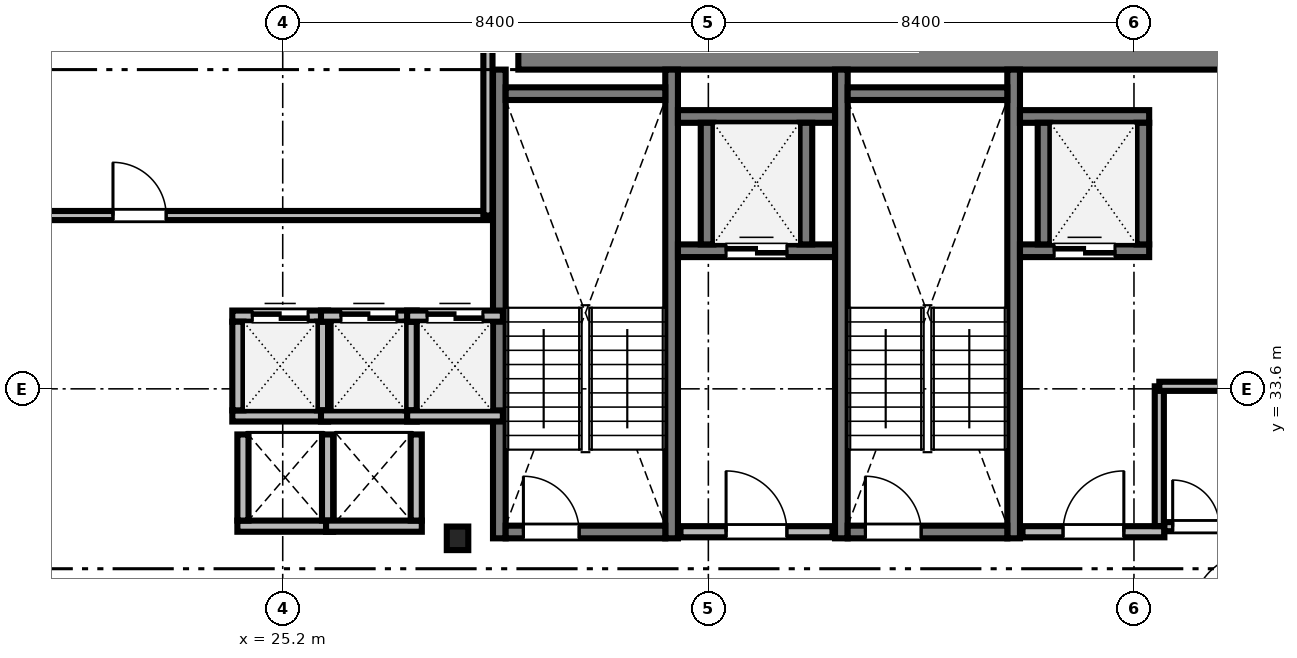
"""IFC4 building model, lengths in metres.
Left out: names, types, materials, properties, quantities, classifications, styles, units other than length and angle.
Written with IfcOpenShell. Run it as: python <this file> out.ifc"""

import sys

from ifc_helpers import new_model, si_unit, direction, frame, frame_2d, origin, origin_2d, place, context, subcontext, project, spatial, rectangle, i_section, extrude, source, transform, mapped, element, fill, save


model = new_model("IFC4")
c1 = context("Model", 3, precision=1e-05, world=origin(), true_north=direction((0.0, 1.0)))
c2 = subcontext(c1, "Body", "Model", "MODEL_VIEW")
j1 = project(units=[si_unit("LENGTHUNIT", "METRE"), si_unit("PLANEANGLEUNIT", "RADIAN")], contexts=[c1])
p1 = place(None, origin())
s1 = spatial("IfcSite", under=j1, at=p1, CompositionType="ELEMENT")
p2 = place(p1, origin())
s2 = spatial("IfcBuilding", under=s1, at=p2, CompositionType="ELEMENT")
p3 = place(p2, frame((0.0, 0.0, 140.9)))
s3 = spatial("IfcBuildingStorey", under=s2, at=p3, CompositionType="ELEMENT", Elevation=140.9)
m1 = source(origin(), c2, "Body", "SweptSolid", [
    extrude(rectangle(XDim=17.52, YDim=0.8, at=frame_2d((8.76, 0.0))), origin(), (0.0, 0.0, 1.0), 3.46),
])
p4 = place(p3, frame((29.85, 40.3, 0.0), z_axis=(0.0, 0.0, 1.0), x_axis=(1.0, 0.0, 0.0)))
e1 = element("IfcWall", 1, at=p4, inside=s3, PredefinedType="SHEAR", context=c2, shape_type="MappedRepresentation", body=[
    mapped(m1, transform((0.0, 0.0, 0.0), scale=1.0)),
])
m2 = source(origin(), c2, "Body", "SweptSolid", [
    extrude(i_section(OverallWidth=0.424, OverallDepth=0.465, WebThickness=0.035, FlangeThickness=0.056, FilletRadius=0.015, at=origin_2d()), origin(), (0.0, 0.0, 1.0), 3.46),
])
p5 = place(p3, frame((28.65, 30.65, 0.0), z_axis=(0.0, 0.0, 1.0), x_axis=(1.0, 0.0, 0.0)))
e2 = element("IfcColumn", 2, at=p5, inside=s3, PredefinedType="COLUMN", context=c2, shape_type="MappedRepresentation", body=[
    mapped(m2, transform((0.0, 0.0, 0.0), scale=1.0)),
])
m3 = source(origin(), c2, "Body", "SweptSolid", [
    extrude(rectangle(XDim=9.25, YDim=0.25, at=frame_2d((4.625, 0.0))), origin(), (0.0, 0.0, 1.0), 3.5),
])
for number, where, z_axis, x_axis in (
    (3, (29.475, 30.65, 0.0), (0.0, 0.0, 1.0), (0.0, 1.0, 0.0)),
    (4, (32.875, 30.65, 0.0), (0.0, 0.0, 1.0), (0.0, 1.0, 0.0)),
):
    element("IfcWall", number, at=place(p3, frame(where, z_axis=z_axis, x_axis=x_axis)), inside=s3, PredefinedType="SOLIDWALL", context=c2, shape_type="MappedRepresentation", body=[
        mapped(m3, transform((0.0, 0.0, 0.0), scale=1.0)),
    ])
m4 = source(origin(), c2, "Body", "SweptSolid", [
    extrude(rectangle(XDim=3.15, YDim=0.25, at=frame_2d((1.575, 0.0))), origin(), (0.0, 0.0, 1.0), 3.5),
])
p6 = place(p3, frame((29.6, 39.425, 0.0), z_axis=(0.0, 0.0, 1.0), x_axis=(1.0, 0.0, 0.0)))
e5 = element("IfcWall", 5, at=p6, inside=s3, PredefinedType="SOLIDWALL", context=c2, shape_type="MappedRepresentation", body=[
    mapped(m4, transform((0.0, 0.0, 0.0), scale=1.0)),
])
p7 = place(p3, frame((29.6, 30.775, 0.0), z_axis=(0.0, 0.0, 1.0), x_axis=(1.0, 0.0, 0.0)))
e6 = element("IfcWall", 6, at=p7, inside=s3, PredefinedType="SOLIDWALL", context=c2, shape_type="MappedRepresentation", body=[
    mapped(m4, transform((0.0, 0.0, 0.0), scale=1.0)),
])
m5 = source(origin(), c2, "Body", "SweptSolid", [
    extrude(rectangle(XDim=1.1, YDim=2.2, at=frame_2d((0.55, 1.1))), frame((0.0, 0.135, 0.0), z_axis=(0.0, -1.0, 0.0), x_axis=(1.0, 0.0, 0.0)), (0.0, 0.0, 1.0), 0.27),
])
p8 = place(p7, frame((0.35, 0.0, 0.0)))
e7 = element("IfcOpeningElement", 7, at=p8, cuts=e6, PredefinedType="OPENING", context=c2, shape_type="MappedRepresentation", body=[
    mapped(m5, transform((0.0, 0.0, 0.0), scale=1.0)),
])
for number, where, z_axis, x_axis in (
    (8, (36.225, 30.65, 0.0), (0.0, 0.0, 1.0), (0.0, 1.0, 0.0)),
    (9, (39.625, 30.65, 0.0), (0.0, 0.0, 1.0), (0.0, 1.0, 0.0)),
):
    element("IfcWall", number, at=place(p3, frame(where, z_axis=z_axis, x_axis=x_axis)), inside=s3, PredefinedType="SOLIDWALL", context=c2, shape_type="MappedRepresentation", body=[
        mapped(m3, transform((0.0, 0.0, 0.0), scale=1.0)),
    ])
p9 = place(p3, frame((36.35, 39.425, 0.0), z_axis=(0.0, 0.0, 1.0), x_axis=(1.0, 0.0, 0.0)))
e10 = element("IfcWall", 10, at=p9, inside=s3, PredefinedType="SOLIDWALL", context=c2, shape_type="MappedRepresentation", body=[
    mapped(m4, transform((0.0, 0.0, 0.0), scale=1.0)),
])
p10 = place(p3, frame((36.35, 30.775, 0.0), z_axis=(0.0, 0.0, 1.0), x_axis=(1.0, 0.0, 0.0)))
e11 = element("IfcWall", 11, at=p10, inside=s3, PredefinedType="SOLIDWALL", context=c2, shape_type="MappedRepresentation", body=[
    mapped(m4, transform((0.0, 0.0, 0.0), scale=1.0)),
])
p11 = place(p10, frame((0.35, 0.0, 0.0)))
e12 = element("IfcOpeningElement", 12, at=p11, cuts=e11, PredefinedType="OPENING", context=c2, shape_type="MappedRepresentation", body=[
    mapped(m5, transform((0.0, 0.0, 0.0), scale=1.0)),
])
m6 = source(origin(), c2, "Body", "SweptSolid", [
    extrude(rectangle(XDim=3.0, YDim=0.22, at=frame_2d((1.5, 0.0))), origin(), (0.0, 0.0, 1.0), 3.46),
])
p12 = place(p3, frame((33.05, 30.78, 0.0), z_axis=(0.0, 0.0, 1.0), x_axis=(1.0, 0.0, 0.0)))
e13 = element("IfcWall", 13, at=p12, inside=s3, PredefinedType="SOLIDWALL", context=c2, shape_type="MappedRepresentation", body=[
    mapped(m6, transform((0.0, 0.0, 0.0), scale=1.0)),
])
m7 = source(origin(), c2, "Body", "SweptSolid", [
    extrude(rectangle(XDim=1.2, YDim=2.2, at=frame_2d((0.6, 1.1))), frame((0.0, 0.12, 0.0), z_axis=(0.0, -1.0, 0.0), x_axis=(1.0, 0.0, 0.0)), (0.0, 0.0, 1.0), 0.24),
])
p13 = place(p12, frame((0.9, 0.0, 0.0)))
e14 = element("IfcOpeningElement", 14, at=p13, cuts=e13, PredefinedType="OPENING", context=c2, shape_type="MappedRepresentation", body=[
    mapped(m7, transform((0.0, 0.0, 0.0), scale=1.0)),
])
m8 = source(origin(), c2, "Body", "SweptSolid", [
    extrude(rectangle(XDim=2.8, YDim=0.22, at=frame_2d((1.4, 0.0))), origin(), (0.0, 0.0, 1.0), 3.46),
])
p14 = place(p3, frame((39.8, 30.78, 0.0), z_axis=(0.0, 0.0, 1.0), x_axis=(1.0, 0.0, 0.0)))
e15 = element("IfcWall", 15, at=p14, inside=s3, PredefinedType="SOLIDWALL", context=c2, shape_type="MappedRepresentation", body=[
    mapped(m8, transform((0.0, 0.0, 0.0), scale=1.0)),
])
p15 = place(p14, frame((0.8, 0.0, 0.0)))
e16 = element("IfcOpeningElement", 16, at=p15, cuts=e15, PredefinedType="OPENING", context=c2, shape_type="MappedRepresentation", body=[
    mapped(m7, transform((0.0, 0.0, 0.0), scale=1.0)),
])
m9 = source(origin(), c2, "Body", "SweptSolid", [
    extrude(rectangle(XDim=1.89, YDim=0.22, at=frame_2d((0.945, 0.0))), origin(), (0.0, 0.0, 1.0), 3.46),
])
p16 = place(p3, frame((24.205, 33.065, 0.0), z_axis=(0.0, 0.0, 1.0), x_axis=(1.0, 0.0, 0.0)))
e17 = element("IfcWall", 17, at=p16, inside=s3, PredefinedType="SOLIDWALL", context=c2, shape_type="MappedRepresentation", body=[
    mapped(m9, transform((0.0, 0.0, 0.0), scale=1.0)),
])
p17 = place(p3, frame((24.205, 35.035, 0.0), z_axis=(0.0, 0.0, 1.0), x_axis=(1.0, 0.0, 0.0)))
e18 = element("IfcWall", 18, at=p17, inside=s3, PredefinedType="SOLIDWALL", context=c2, shape_type="MappedRepresentation", body=[
    mapped(m9, transform((0.0, 0.0, 0.0), scale=1.0)),
])
m10 = source(origin(), c2, "Body", "SweptSolid", [
    extrude(rectangle(XDim=1.1, YDim=2.2, at=frame_2d((0.55, 1.1))), frame((0.0, 0.12, 0.0), z_axis=(0.0, -1.0, 0.0), x_axis=(1.0, 0.0, 0.0)), (0.0, 0.0, 1.0), 0.24),
])
p18 = place(p17, frame((0.395, 0.0, 0.0)))
e19 = element("IfcOpeningElement", 19, at=p18, cuts=e18, PredefinedType="OPENING", context=c2, shape_type="MappedRepresentation", body=[
    mapped(m10, transform((0.0, 0.0, 0.0), scale=1.0)),
])
m11 = source(origin(), c2, "Body", "SweptSolid", [
    extrude(rectangle(XDim=1.75, YDim=0.22, at=frame_2d((0.875, 0.0))), origin(), (0.0, 0.0, 1.0), 3.46),
])
for number, where, z_axis, x_axis in (
    (20, (24.315, 33.175, 0.0), (0.0, 0.0, 1.0), (0.0, 1.0, 0.0)),
    (21, (25.985, 33.175, 0.0), (0.0, 0.0, 1.0), (0.0, 1.0, 0.0)),
):
    element("IfcWall", number, at=place(p3, frame(where, z_axis=z_axis, x_axis=x_axis)), inside=s3, PredefinedType="SOLIDWALL", context=c2, shape_type="MappedRepresentation", body=[
        mapped(m11, transform((0.0, 0.0, 0.0), scale=1.0)),
    ])
p19 = place(p3, frame((25.955, 33.065, 0.0), z_axis=(0.0, 0.0, 1.0), x_axis=(1.0, 0.0, 0.0)))
e22 = element("IfcWall", 22, at=p19, inside=s3, PredefinedType="SOLIDWALL", context=c2, shape_type="MappedRepresentation", body=[
    mapped(m9, transform((0.0, 0.0, 0.0), scale=1.0)),
])
p20 = place(p3, frame((25.955, 35.035, 0.0), z_axis=(0.0, 0.0, 1.0), x_axis=(1.0, 0.0, 0.0)))
e23 = element("IfcWall", 23, at=p20, inside=s3, PredefinedType="SOLIDWALL", context=c2, shape_type="MappedRepresentation", body=[
    mapped(m9, transform((0.0, 0.0, 0.0), scale=1.0)),
])
p21 = place(p20, frame((0.395, 0.0, 0.0)))
e24 = element("IfcOpeningElement", 24, at=p21, cuts=e23, PredefinedType="OPENING", context=c2, shape_type="MappedRepresentation", body=[
    mapped(m10, transform((0.0, 0.0, 0.0), scale=1.0)),
])
p22 = place(p3, frame((27.735, 33.175, 0.0), z_axis=(0.0, 0.0, 1.0), x_axis=(0.0, 1.0, 0.0)))
e25 = element("IfcWall", 25, at=p22, inside=s3, PredefinedType="SOLIDWALL", context=c2, shape_type="MappedRepresentation", body=[
    mapped(m11, transform((0.0, 0.0, 0.0), scale=1.0)),
])
p23 = place(p3, frame((27.655, 33.065, 0.0), z_axis=(0.0, 0.0, 1.0), x_axis=(1.0, 0.0, 0.0)))
e26 = element("IfcWall", 26, at=p23, inside=s3, PredefinedType="SOLIDWALL", context=c2, shape_type="MappedRepresentation", body=[
    mapped(m9, transform((0.0, 0.0, 0.0), scale=1.0)),
])
p24 = place(p3, frame((27.655, 35.035, 0.0), z_axis=(0.0, 0.0, 1.0), x_axis=(1.0, 0.0, 0.0)))
e27 = element("IfcWall", 27, at=p24, inside=s3, PredefinedType="SOLIDWALL", context=c2, shape_type="MappedRepresentation", body=[
    mapped(m9, transform((0.0, 0.0, 0.0), scale=1.0)),
])
p25 = place(p24, frame((0.395, 0.0, 0.0)))
e28 = element("IfcOpeningElement", 28, at=p25, cuts=e27, PredefinedType="OPENING", context=c2, shape_type="MappedRepresentation", body=[
    mapped(m10, transform((0.0, 0.0, 0.0), scale=1.0)),
])
m12 = source(origin(), c2, "Body", "SweptSolid", [
    extrude(rectangle(XDim=3.1, YDim=0.25, at=frame_2d((1.55, 0.0))), origin(), (0.0, 0.0, 1.0), 3.46),
])
p26 = place(p3, frame((33.0, 36.325, 0.0), z_axis=(0.0, 0.0, 1.0), x_axis=(1.0, 0.0, 0.0)))
e29 = element("IfcWall", 29, at=p26, inside=s3, PredefinedType="SOLIDWALL", context=c2, shape_type="MappedRepresentation", body=[
    mapped(m12, transform((0.0, 0.0, 0.0), scale=1.0)),
])
m13 = source(origin(), c2, "Body", "SweptSolid", [
    extrude(rectangle(XDim=1.2, YDim=2.25, at=frame_2d((0.6, 1.125))), frame((0.0, 0.135, 0.0), z_axis=(0.0, -1.0, 0.0), x_axis=(1.0, 0.0, 0.0)), (0.0, 0.0, 1.0), 0.27),
])
p27 = place(p26, frame((0.95, 0.0, 0.0)))
e30 = element("IfcOpeningElement", 30, at=p27, cuts=e29, PredefinedType="OPENING", context=c2, shape_type="MappedRepresentation", body=[
    mapped(m13, transform((0.0, 0.0, 0.0), scale=1.0)),
])
p28 = place(p3, frame((33.0, 38.975, 0.0), z_axis=(0.0, 0.0, 1.0), x_axis=(1.0, 0.0, 0.0)))
e31 = element("IfcWall", 31, at=p28, inside=s3, PredefinedType="SOLIDWALL", context=c2, shape_type="MappedRepresentation", body=[
    mapped(m12, transform((0.0, 0.0, 0.0), scale=1.0)),
])
m14 = source(origin(), c2, "Body", "SweptSolid", [
    extrude(rectangle(XDim=2.4, YDim=0.25, at=frame_2d((1.2, 0.0))), origin(), (0.0, 0.0, 1.0), 3.46),
])
for number, where, z_axis, x_axis in (
    (32, (33.575, 36.45, 0.0), (0.0, 0.0, 1.0), (0.0, 1.0, 0.0)),
    (33, (35.525, 36.45, 0.0), (0.0, 0.0, 1.0), (0.0, 1.0, 0.0)),
):
    element("IfcWall", number, at=place(p3, frame(where, z_axis=z_axis, x_axis=x_axis)), inside=s3, PredefinedType="SOLIDWALL", context=c2, shape_type="MappedRepresentation", body=[
        mapped(m14, transform((0.0, 0.0, 0.0), scale=1.0)),
    ])
m15 = source(origin(), c2, "Body", "SweptSolid", [
    extrude(rectangle(XDim=2.55, YDim=0.25, at=frame_2d((1.275, 0.0))), origin(), (0.0, 0.0, 1.0), 3.46),
])
p29 = place(p3, frame((39.75, 36.325, 0.0), z_axis=(0.0, 0.0, 1.0), x_axis=(1.0, 0.0, 0.0)))
e34 = element("IfcWall", 34, at=p29, inside=s3, PredefinedType="SOLIDWALL", context=c2, shape_type="MappedRepresentation", body=[
    mapped(m15, transform((0.0, 0.0, 0.0), scale=1.0)),
])
p30 = place(p29, frame((0.675, 0.0, 0.0)))
e35 = element("IfcOpeningElement", 35, at=p30, cuts=e34, PredefinedType="OPENING", context=c2, shape_type="MappedRepresentation", body=[
    mapped(m13, transform((0.0, 0.0, 0.0), scale=1.0)),
])
p31 = place(p3, frame((39.75, 38.975, 0.0), z_axis=(0.0, 0.0, 1.0), x_axis=(1.0, 0.0, 0.0)))
e36 = element("IfcWall", 36, at=p31, inside=s3, PredefinedType="SOLIDWALL", context=c2, shape_type="MappedRepresentation", body=[
    mapped(m15, transform((0.0, 0.0, 0.0), scale=1.0)),
])
for number, where, z_axis, x_axis in (
    (37, (40.225, 36.45, 0.0), (0.0, 0.0, 1.0), (0.0, 1.0, 0.0)),
    (38, (42.175, 36.45, 0.0), (0.0, 0.0, 1.0), (0.0, 1.0, 0.0)),
):
    element("IfcWall", number, at=place(p3, frame(where, z_axis=z_axis, x_axis=x_axis)), inside=s3, PredefinedType="SOLIDWALL", context=c2, shape_type="MappedRepresentation", body=[
        mapped(m14, transform((0.0, 0.0, 0.0), scale=1.0)),
    ])
m16 = source(origin(), c2, "Body", "SweptSolid", [
    extrude(rectangle(XDim=1.89, YDim=0.22, at=frame_2d((0.945, 0.0))), origin(), (0.0, 0.0, 1.0), 3.46),
])
p32 = place(p3, frame((24.305, 30.89, 0.0), z_axis=(0.0, 0.0, 1.0), x_axis=(1.0, 0.0, 0.0)))
e39 = element("IfcWall", 39, at=p32, inside=s3, PredefinedType="SOLIDWALL", context=c2, shape_type="MappedRepresentation", body=[
    mapped(m16, transform((0.0, 0.0, 0.0), scale=1.0)),
])
m17 = source(origin(), c2, "Body", "SweptSolid", [
    extrude(rectangle(XDim=1.7, YDim=0.22, at=frame_2d((0.85, 0.0))), origin(), (0.0, 0.0, 1.0), 3.46),
])
for number, where, z_axis, x_axis in (
    (40, (24.415, 31.0, 0.0), (0.0, 0.0, 1.0), (0.0, 1.0, 0.0)),
    (41, (26.085, 31.0, 0.0), (0.0, 0.0, 1.0), (0.0, 1.0, 0.0)),
):
    element("IfcWall", number, at=place(p3, frame(where, z_axis=z_axis, x_axis=x_axis)), inside=s3, PredefinedType="SOLIDWALL", context=c2, shape_type="MappedRepresentation", body=[
        mapped(m17, transform((0.0, 0.0, 0.0), scale=1.0)),
    ])
p33 = place(p3, frame((26.055, 30.89, 0.0), z_axis=(0.0, 0.0, 1.0), x_axis=(1.0, 0.0, 0.0)))
e42 = element("IfcWall", 42, at=p33, inside=s3, PredefinedType="SOLIDWALL", context=c2, shape_type="MappedRepresentation", body=[
    mapped(m16, transform((0.0, 0.0, 0.0), scale=1.0)),
])
p34 = place(p3, frame((27.835, 31.0, 0.0), z_axis=(0.0, 0.0, 1.0), x_axis=(0.0, 1.0, 0.0)))
e43 = element("IfcWall", 43, at=p34, inside=s3, PredefinedType="SOLIDWALL", context=c2, shape_type="MappedRepresentation", body=[
    mapped(m17, transform((0.0, 0.0, 0.0), scale=1.0)),
])
m18 = source(origin(), c2, "Body", "SweptSolid", [
    extrude(rectangle(XDim=22.328, YDim=0.18, at=frame_2d((11.164, 0.0))), origin(), (0.0, 0.0, 1.0), 2.702),
])
p35 = place(p3, frame((6.922, 37.02, 0.0), z_axis=(0.0, 0.0, 1.0), x_axis=(1.0, 0.0, 0.0)))
e44 = element("IfcWall", 44, at=p35, inside=s3, PredefinedType="PARTITIONING", context=c2, shape_type="MappedRepresentation", body=[
    mapped(m18, transform((0.0, 0.0, 0.0), scale=1.0)),
])
m19 = source(origin(), c2, "Body", "SweptSolid", [
    extrude(rectangle(XDim=1.05, YDim=2.2, at=frame_2d((0.525, 1.1))), frame((0.0, 0.1, 0.0), z_axis=(0.0, -1.0, 0.0), x_axis=(1.0, 0.0, 0.0)), (0.0, 0.0, 1.0), 0.2),
])
p36 = place(p35, frame((14.928, 0.0, 0.0)))
e45 = element("IfcOpeningElement", 45, at=p36, cuts=e44, PredefinedType="OPENING", context=c2, shape_type="MappedRepresentation", body=[
    mapped(m19, transform((0.0, 0.0, 0.0), scale=1.0)),
])
m20 = source(origin(), c2, "Body", "SweptSolid", [
    extrude(rectangle(XDim=1.248, YDim=0.18, at=frame_2d((0.624, 0.0))), origin(), (0.0, 0.0, 1.0), 3.46),
])
p37 = place(p3, frame((42.6, 30.88, 0.0), z_axis=(0.0, 0.0, 1.0), x_axis=(1.0, 0.0, 0.0)))
e46 = element("IfcWall", 46, at=p37, inside=s3, PredefinedType="PARTITIONING", context=c2, shape_type="MappedRepresentation", body=[
    mapped(m20, transform((0.0, 0.0, 0.0), scale=1.0)),
])
m21 = source(origin(), c2, "Body", "SweptSolid", [
    extrude(rectangle(XDim=0.92, YDim=2.1, at=frame_2d((0.46, 1.05))), frame((0.0, 0.1, 0.0), z_axis=(0.0, -1.0, 0.0), x_axis=(1.0, 0.0, 0.0)), (0.0, 0.0, 1.0), 0.2),
])
p38 = place(p37, frame((0.164, 0.0, 0.0)))
e47 = element("IfcOpeningElement", 47, at=p38, cuts=e46, PredefinedType="OPENING", context=c2, shape_type="MappedRepresentation", body=[
    mapped(m21, transform((0.0, 0.0, 0.0), scale=1.0)),
])
m22 = source(origin(), c2, "Body", "SweptSolid", [
    extrude(rectangle(XDim=11.45, YDim=0.18, at=frame_2d((5.725, 0.0))), origin(), (0.0, 0.0, 1.0), 2.702),
])
p39 = place(p3, frame((29.25, 37.02, 0.0), z_axis=(0.0, 0.0, 1.0), x_axis=(0.0, 1.0, 0.0)))
e48 = element("IfcWall", 48, at=p39, inside=s3, PredefinedType="PARTITIONING", context=c2, shape_type="MappedRepresentation", body=[
    mapped(m22, transform((0.0, 0.0, 0.0), scale=1.0)),
])
m23 = source(origin(), c2, "Body", "SweptSolid", [
    extrude(rectangle(XDim=2.758, YDim=0.18, at=frame_2d((1.379, 0.0))), origin(), (0.0, 0.0, 1.0), 3.46),
])
p40 = place(p3, frame((42.5, 30.892, 0.0), z_axis=(0.0, 0.0, 1.0), x_axis=(0.0, 1.0, 0.0)))
e49 = element("IfcWall", 49, at=p40, inside=s3, PredefinedType="PARTITIONING", context=c2, shape_type="MappedRepresentation", body=[
    mapped(m23, transform((0.0, 0.0, 0.0), scale=1.0)),
])
m24 = source(origin(), c2, "Body", "SweptSolid", [
    extrude(rectangle(XDim=1.348, YDim=0.18, at=frame_2d((0.674, 0.0))), origin(), (0.0, 0.0, 1.0), 3.46),
])
p41 = place(p3, frame((42.5, 33.65, 0.0), z_axis=(0.0, 0.0, 1.0), x_axis=(1.0, 0.0, 0.0)))
e50 = element("IfcWall", 50, at=p41, inside=s3, PredefinedType="PARTITIONING", context=c2, shape_type="MappedRepresentation", body=[
    mapped(m24, transform((0.0, 0.0, 0.0), scale=1.0)),
])
m25 = source(origin(), c2, "Body", "SweptSolid", [
    extrude(rectangle(XDim=1.1, YDim=2.2, at=frame_2d((0.55, 1.1))), frame((0.0, 0.025, 0.0), z_axis=(0.0, -1.0, 0.0), x_axis=(1.0, 0.0, 0.0)), (0.0, 0.0, 1.0), 0.05),
])
p42 = place(p8, origin())
e51 = element("IfcDoor", 51, at=p42, inside=s3, OperationType="SINGLE_SWING_LEFT", PredefinedType="DOOR", context=c2, shape_type="MappedRepresentation", body=[
    mapped(m25, transform((0.0, 0.0, 0.0), scale=1.0)),
])
fill(e7, e51)
p43 = place(p11, origin())
e52 = element("IfcDoor", 52, at=p43, inside=s3, OperationType="SINGLE_SWING_LEFT", PredefinedType="DOOR", context=c2, shape_type="MappedRepresentation", body=[
    mapped(m25, transform((0.0, 0.0, 0.0), scale=1.0)),
])
fill(e12, e52)
m26 = source(origin(), c2, "Body", "SweptSolid", [
    extrude(rectangle(XDim=1.2, YDim=2.2, at=frame_2d((0.6, 1.1))), frame((0.0, 0.025, 0.0), z_axis=(0.0, -1.0, 0.0), x_axis=(1.0, 0.0, 0.0)), (0.0, 0.0, 1.0), 0.05),
])
p44 = place(p13, origin())
e53 = element("IfcDoor", 53, at=p44, inside=s3, OperationType="SINGLE_SWING_LEFT", PredefinedType="DOOR", context=c2, shape_type="MappedRepresentation", body=[
    mapped(m26, transform((0.0, 0.0, 0.0), scale=1.0)),
])
fill(e14, e53)
p45 = place(p15, origin())
e54 = element("IfcDoor", 54, at=p45, inside=s3, OperationType="SINGLE_SWING_RIGHT", PredefinedType="DOOR", context=c2, shape_type="MappedRepresentation", body=[
    mapped(m26, transform((0.0, 0.0, 0.0), scale=1.0)),
])
fill(e16, e54)
p46 = place(p18, origin())
e55 = element("IfcDoor", 55, at=p46, inside=s3, OperationType="DOUBLE_DOOR_SLIDING", PredefinedType="DOOR", context=c2, shape_type="MappedRepresentation", body=[
    mapped(m25, transform((0.0, 0.0, 0.0), scale=1.0)),
])
fill(e19, e55)
p47 = place(p21, origin())
e56 = element("IfcDoor", 56, at=p47, inside=s3, OperationType="DOUBLE_DOOR_SLIDING", PredefinedType="DOOR", context=c2, shape_type="MappedRepresentation", body=[
    mapped(m25, transform((0.0, 0.0, 0.0), scale=1.0)),
])
fill(e24, e56)
p48 = place(p25, origin())
e57 = element("IfcDoor", 57, at=p48, inside=s3, OperationType="DOUBLE_DOOR_SLIDING", PredefinedType="DOOR", context=c2, shape_type="MappedRepresentation", body=[
    mapped(m25, transform((0.0, 0.0, 0.0), scale=1.0)),
])
fill(e28, e57)
m27 = source(origin(), c2, "Body", "SweptSolid", [
    extrude(rectangle(XDim=1.2, YDim=2.25, at=frame_2d((0.6, 1.125))), frame((0.0, 0.025, 0.0), z_axis=(0.0, -1.0, 0.0), x_axis=(1.0, 0.0, 0.0)), (0.0, 0.0, 1.0), 0.05),
])
p49 = place(p27, origin())
e58 = element("IfcDoor", 58, at=p49, inside=s3, OperationType="DOUBLE_DOOR_SLIDING", PredefinedType="DOOR", context=c2, shape_type="MappedRepresentation", body=[
    mapped(m27, transform((0.0, 0.0, 0.0), scale=1.0)),
])
fill(e30, e58)
p50 = place(p30, origin())
e59 = element("IfcDoor", 59, at=p50, inside=s3, OperationType="DOUBLE_DOOR_SLIDING", PredefinedType="DOOR", context=c2, shape_type="MappedRepresentation", body=[
    mapped(m27, transform((0.0, 0.0, 0.0), scale=1.0)),
])
fill(e35, e59)
m28 = source(origin(), c2, "Body", "SweptSolid", [
    extrude(rectangle(XDim=1.05, YDim=2.2, at=frame_2d((0.525, 1.1))), frame((0.0, 0.025, 0.0), z_axis=(0.0, -1.0, 0.0), x_axis=(1.0, 0.0, 0.0)), (0.0, 0.0, 1.0), 0.05),
])
p51 = place(p36, origin())
e60 = element("IfcDoor", 60, at=p51, inside=s3, OperationType="SINGLE_SWING_LEFT", PredefinedType="DOOR", context=c2, shape_type="MappedRepresentation", body=[
    mapped(m28, transform((0.0, 0.0, 0.0), scale=1.0)),
])
fill(e45, e60)
m29 = source(origin(), c2, "Body", "SweptSolid", [
    extrude(rectangle(XDim=0.92, YDim=2.1, at=frame_2d((0.46, 1.05))), frame((0.0, 0.025, 0.0), z_axis=(0.0, -1.0, 0.0), x_axis=(1.0, 0.0, 0.0)), (0.0, 0.0, 1.0), 0.05),
])
p52 = place(p38, origin())
e61 = element("IfcDoor", 61, at=p52, inside=s3, OperationType="SINGLE_SWING_LEFT", PredefinedType="DOOR", context=c2, shape_type="MappedRepresentation", body=[
    mapped(m29, transform((0.0, 0.0, 0.0), scale=1.0)),
])
fill(e47, e61)
save(model, sys.argv[1])
